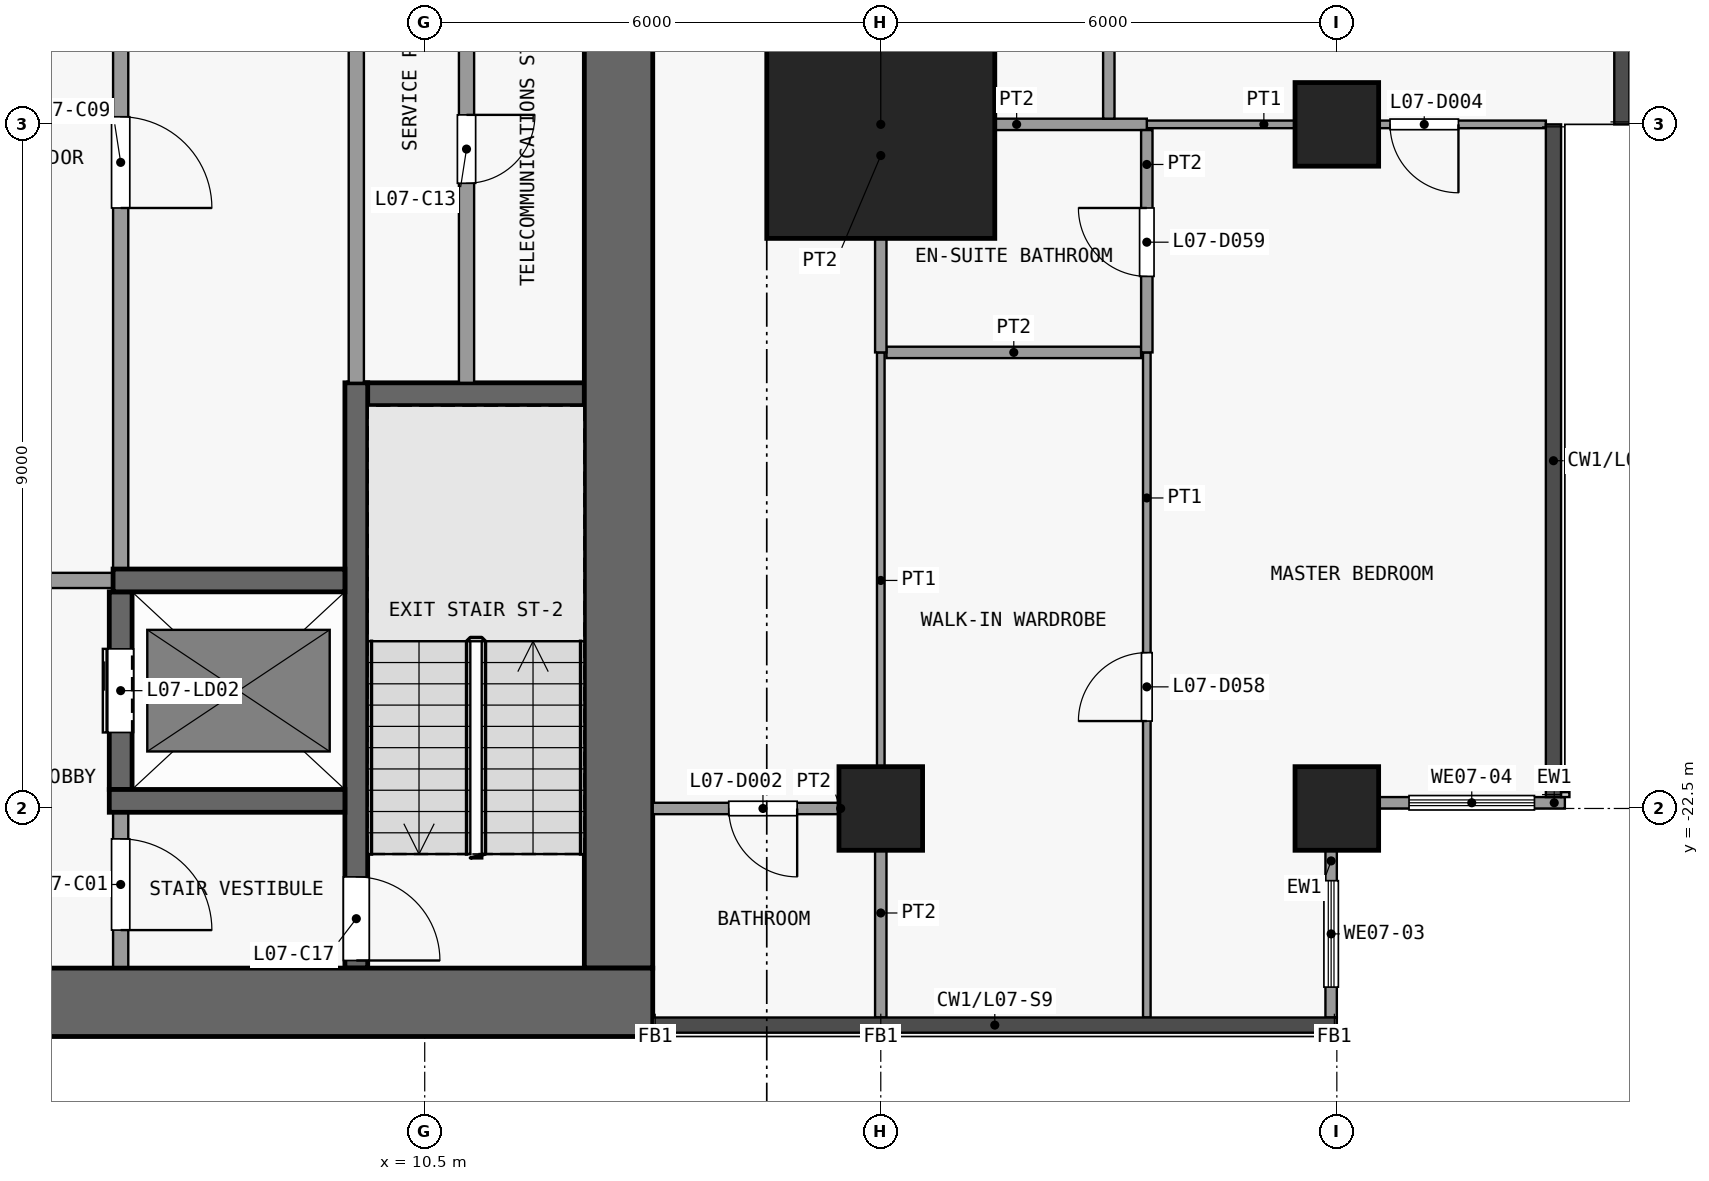
"""IFC4 building model, lengths in metres.
Left out: names, types, materials, properties, quantities, classifications, styles, units other than length and angle.
Written with IfcOpenShell. Run it as: python <this file> out.ifc"""

import sys

from ifc_helpers import new_model, si_unit, direction, frame, frame_2d, origin, origin_2d, place, context, subcontext, project, spatial, rectangle, extrude, element, fill, save


model = new_model("IFC4")
c1 = context("Model", 3, precision=1e-05, world=origin(), true_north=direction((0.0, 1.0)))
c2 = subcontext(c1, "Body", "Model", "MODEL_VIEW")
j1 = project(units=[si_unit("LENGTHUNIT", "METRE"), si_unit("PLANEANGLEUNIT", "RADIAN")], contexts=[c1])
p1 = place(None, origin())
s1 = spatial("IfcSite", under=j1, at=p1, CompositionType="ELEMENT")
p2 = place(p1, origin())
s2 = spatial("IfcBuilding", under=s1, at=p2, CompositionType="ELEMENT")
p3 = place(p2, frame((0.0, 0.0, 36.1)))
s3 = spatial("IfcBuildingStorey", under=s2, at=p3, CompositionType="ELEMENT", Elevation=36.1)
p4 = place(p3, frame((16.5, -22.5, 0.0), z_axis=(0.0, 0.0, 1.0), x_axis=(1.0, 0.0, 0.0)))
e1 = element("IfcColumn", 1, at=p4, inside=s3, PredefinedType="COLUMN", context=c2, shape_type="SweptSolid", body=[
    extrude(rectangle(XDim=1.1, YDim=1.1, at=origin_2d()), origin(), (0.0, 0.0, 1.0), 3.6),
])
p5 = place(p3, frame((16.5, -13.5, 0.0), z_axis=(0.0, 0.0, 1.0), x_axis=(1.0, 0.0, 0.0)))
e2 = element("IfcColumn", 2, at=p5, inside=s3, PredefinedType="COLUMN", context=c2, shape_type="SweptSolid", body=[
    extrude(rectangle(XDim=3.0, YDim=3.0, at=origin_2d()), origin(), (0.0, 0.0, 1.0), 3.6),
])
for number, where, z_axis, x_axis in (
    (3, (22.5, -22.5, 0.0), (0.0, 0.0, 1.0), (1.0, 0.0, 0.0)),
    (4, (22.5, -13.5, 0.0), (0.0, 0.0, 1.0), (1.0, 0.0, 0.0)),
):
    element("IfcColumn", number, at=place(p3, frame(where, z_axis=z_axis, x_axis=x_axis)), inside=s3, PredefinedType="COLUMN", context=c2, shape_type="SweptSolid", body=[
        extrude(rectangle(XDim=1.1, YDim=1.1, at=origin_2d()), origin(), (0.0, 0.0, 1.0), 3.6),
    ])
p6 = place(p3, frame((-13.5, -25.05, 0.0), z_axis=(0.0, 0.0, 1.0), x_axis=(1.0, 0.0, 0.0)))
e5 = element("IfcWall", 5, at=p6, inside=s3, PredefinedType="SHEAR", context=c2, shape_type="SweptSolid", body=[
    extrude(rectangle(XDim=27.0, YDim=0.9, at=frame_2d((13.5, 0.0))), origin(), (0.0, 0.0, 1.0), 3.3),
])
p7 = place(p3, frame((13.05, -24.6, 0.0), z_axis=(0.0, 0.0, 1.0), x_axis=(0.0, 1.0, 0.0)))
e6 = element("IfcWall", 6, at=p7, inside=s3, PredefinedType="SHEAR", context=c2, shape_type="SweptSolid", body=[
    extrude(rectangle(XDim=16.1, YDim=0.9, at=frame_2d((8.05, 0.0))), origin(), (0.0, 0.0, 1.0), 3.3),
])
p8 = place(p3, frame((6.35, -22.4, 0.0), z_axis=(0.0, 0.0, 1.0), x_axis=(1.0, 0.0, 0.0)))
e7 = element("IfcWall", 7, at=p8, inside=s3, PredefinedType="SHEAR", context=c2, shape_type="SweptSolid", body=[
    extrude(rectangle(XDim=3.1, YDim=0.3, at=frame_2d((1.55, 0.0))), origin(), (0.0, 0.0, 1.0), 3.3),
])
p9 = place(p3, frame((6.4, -19.5, 0.0), z_axis=(0.0, 0.0, 1.0), x_axis=(-1.0, 0.0, 0.0)))
e8 = element("IfcWall", 8, at=p9, inside=s3, PredefinedType="PARTITIONING", context=c2, shape_type="SweptSolid", body=[
    extrude(rectangle(XDim=3.375, YDim=0.2, at=frame_2d((1.688, 0.0))), origin(), (0.0, 0.0, 1.0), 3.3),
])
p10 = place(p9, frame((0.85, 0.0, 0.0)))
e9 = element("IfcOpeningElement", 9, at=p10, cuts=e8, PredefinedType="OPENING", context=c2, shape_type="SweptSolid", body=[
    extrude(rectangle(XDim=1.5, YDim=2.1, at=frame_2d((0.75, 1.05))), frame((0.0, 0.11, 0.0), z_axis=(0.0, -1.0, 0.0), x_axis=(1.0, 0.0, 0.0)), (0.0, 0.0, 1.0), 0.22),
])
p11 = place(p3, frame((6.4, -19.5, 0.0), z_axis=(0.0, 0.0, 1.0), x_axis=(1.0, 0.0, 0.0)))
e10 = element("IfcWall", 10, at=p11, inside=s3, PredefinedType="SHEAR", context=c2, shape_type="SweptSolid", body=[
    extrude(rectangle(XDim=3.05, YDim=0.3, at=frame_2d((1.525, 0.0))), origin(), (0.0, 0.0, 1.0), 3.3),
])
p12 = place(p3, frame((9.5, -17.05, 0.0), z_axis=(0.0, 0.0, 1.0), x_axis=(1.0, 0.0, 0.0)))
e11 = element("IfcWall", 11, at=p12, inside=s3, PredefinedType="SHEAR", context=c2, shape_type="SweptSolid", body=[
    extrude(rectangle(XDim=3.1, YDim=0.3, at=frame_2d((1.55, 0.0))), origin(), (0.0, 0.0, 1.0), 3.3),
])
p13 = place(p3, frame((6.5, -22.55, 0.0), z_axis=(0.0, 0.0, 1.0), x_axis=(0.0, -1.0, 0.0)))
e12 = element("IfcWall", 12, at=p13, inside=s3, PredefinedType="PARTITIONING", context=c2, shape_type="SweptSolid", body=[
    extrude(rectangle(XDim=2.05, YDim=0.2, at=frame_2d((1.025, 0.0))), origin(), (0.0, 0.0, 1.0), 3.3),
])
p14 = place(p13, frame((0.35, 0.0, 0.0)))
e13 = element("IfcOpeningElement", 13, at=p14, cuts=e12, PredefinedType="OPENING", context=c2, shape_type="SweptSolid", body=[
    extrude(rectangle(XDim=1.2, YDim=2.1, at=frame_2d((0.6, 1.05))), frame((0.0, 0.11, 0.0), z_axis=(0.0, -1.0, 0.0), x_axis=(1.0, 0.0, 0.0)), (0.0, 0.0, 1.0), 0.22),
])
p15 = place(p3, frame((6.5, -22.25, 0.0), z_axis=(0.0, 0.0, 1.0), x_axis=(0.0, 1.0, 0.0)))
e14 = element("IfcWall", 14, at=p15, inside=s3, PredefinedType="SHEAR", context=c2, shape_type="SweptSolid", body=[
    extrude(rectangle(XDim=2.6, YDim=0.3, at=frame_2d((1.3, 0.0))), origin(), (0.0, 0.0, 1.0), 3.3),
])
p16 = place(p15, frame((0.75, 0.0, 0.0)))
e15 = element("IfcOpeningElement", 15, at=p16, cuts=e14, PredefinedType="OPENING", context=c2, shape_type="SweptSolid", body=[
    extrude(rectangle(XDim=1.1, YDim=2.1, at=frame_2d((0.55, 1.05))), frame((0.0, 0.16, 0.0), z_axis=(0.0, -1.0, 0.0), x_axis=(1.0, 0.0, 0.0)), (0.0, 0.0, 1.0), 0.32),
])
p17 = place(p3, frame((6.5, -8.5, 0.0), z_axis=(0.0, 0.0, 1.0), x_axis=(0.0, -1.0, 0.0)))
e16 = element("IfcWall", 16, at=p17, inside=s3, PredefinedType="PARTITIONING", context=c2, shape_type="SweptSolid", body=[
    extrude(rectangle(XDim=10.85, YDim=0.2, at=frame_2d((5.425, 0.0))), origin(), (0.0, 0.0, 1.0), 3.3),
])
p18 = place(p17, frame((4.9, 0.0, 0.0)))
e17 = element("IfcOpeningElement", 17, at=p18, cuts=e16, PredefinedType="OPENING", context=c2, shape_type="SweptSolid", body=[
    extrude(rectangle(XDim=1.2, YDim=2.1, at=frame_2d((0.6, 1.05))), frame((0.0, 0.11, 0.0), z_axis=(0.0, -1.0, 0.0), x_axis=(1.0, 0.0, 0.0)), (0.0, 0.0, 1.0), 0.22),
])
p19 = place(p3, frame((9.6, -16.9, 0.0), z_axis=(0.0, 0.0, 1.0), x_axis=(0.0, -1.0, 0.0)))
e18 = element("IfcWall", 18, at=p19, inside=s3, PredefinedType="SHEAR", context=c2, shape_type="SweptSolid", body=[
    extrude(rectangle(XDim=7.7, YDim=0.3, at=frame_2d((3.85, 0.0))), origin(), (0.0, 0.0, 1.0), 3.3),
])
p20 = place(p19, frame((6.5, 0.0, 0.0)))
e19 = element("IfcOpeningElement", 19, at=p20, cuts=e18, PredefinedType="OPENING", context=c2, shape_type="SweptSolid", body=[
    extrude(rectangle(XDim=1.1, YDim=2.1, at=frame_2d((0.55, 1.05))), frame((0.0, 0.16, 0.0), z_axis=(0.0, -1.0, 0.0), x_axis=(1.0, 0.0, 0.0)), (0.0, 0.0, 1.0), 0.32),
])
p21 = place(p3, frame((9.6, -16.9, 0.0), z_axis=(0.0, 0.0, 1.0), x_axis=(0.0, 1.0, 0.0)))
e20 = element("IfcWall", 20, at=p21, inside=s3, PredefinedType="PARTITIONING", context=c2, shape_type="SweptSolid", body=[
    extrude(rectangle(XDim=8.4, YDim=0.2, at=frame_2d((4.2, 0.0))), origin(), (0.0, 0.0, 1.0), 3.3),
])
p22 = place(p3, frame((11.05, -10.5, 0.0), z_axis=(0.0, 0.0, 1.0), x_axis=(0.0, -1.0, 0.0)))
e21 = element("IfcWall", 21, at=p22, inside=s3, PredefinedType="PARTITIONING", context=c2, shape_type="SweptSolid", body=[
    extrude(rectangle(XDim=6.4, YDim=0.2, at=frame_2d((3.2, 0.0))), origin(), (0.0, 0.0, 1.0), 3.3),
])
p23 = place(p22, frame((2.875, 0.0, 0.0)))
e22 = element("IfcOpeningElement", 22, at=p23, cuts=e21, PredefinedType="OPENING", context=c2, shape_type="SweptSolid", body=[
    extrude(rectangle(XDim=0.9, YDim=2.1, at=frame_2d((0.45, 1.05))), frame((0.0, 0.11, 0.0), z_axis=(0.0, -1.0, 0.0), x_axis=(1.0, 0.0, 0.0)), (0.0, 0.0, 1.0), 0.22),
])
p24 = place(p3, frame((22.425, -23.05, 0.0), z_axis=(0.0, 0.0, 1.0), x_axis=(0.0, -1.0, 0.0)))
e23 = element("IfcWall", 23, at=p24, inside=s3, PredefinedType="SOLIDWALL", context=c2, shape_type="SweptSolid", body=[
    extrude(rectangle(XDim=2.2, YDim=0.15, at=frame_2d((1.1, 0.0))), origin(), (0.0, 0.0, 1.0), 3.3),
])
p25 = place(p24, frame((0.4, 0.0, 0.9)))
e24 = element("IfcOpeningElement", 24, at=p25, cuts=e23, PredefinedType="OPENING", context=c2, shape_type="SweptSolid", body=[
    extrude(rectangle(XDim=1.4, YDim=2.4, at=frame_2d((0.7, 1.2))), frame((0.0, 0.085, 0.0), z_axis=(0.0, -1.0, 0.0), x_axis=(1.0, 0.0, 0.0)), (0.0, 0.0, 1.0), 0.17),
])
p26 = place(p3, frame((25.5, -22.425, 0.0), z_axis=(0.0, 0.0, 1.0), x_axis=(-1.0, 0.0, 0.0)))
e25 = element("IfcWall", 25, at=p26, inside=s3, PredefinedType="SOLIDWALL", context=c2, shape_type="SweptSolid", body=[
    extrude(rectangle(XDim=2.45, YDim=0.15, at=frame_2d((1.225, 0.0))), origin(), (0.0, 0.0, 1.0), 3.3),
])
p27 = place(p26, frame((0.4, 0.0, 0.9)))
e26 = element("IfcOpeningElement", 26, at=p27, cuts=e25, PredefinedType="OPENING", context=c2, shape_type="SweptSolid", body=[
    extrude(rectangle(XDim=1.65, YDim=2.4, at=frame_2d((0.825, 1.2))), frame((0.0, 0.085, 0.0), z_axis=(0.0, -1.0, 0.0), x_axis=(1.0, 0.0, 0.0)), (0.0, 0.0, 1.0), 0.17),
])
p28 = place(p3, frame((13.5, -22.5, 0.0), z_axis=(0.0, 0.0, 1.0), x_axis=(1.0, 0.0, 0.0)))
e27 = element("IfcWall", 27, at=p28, inside=s3, PredefinedType="PARTITIONING", context=c2, shape_type="SweptSolid", body=[
    extrude(rectangle(XDim=2.925, YDim=0.15, at=frame_2d((1.462, 0.0))), origin(), (0.0, 0.0, 1.0), 3.3),
])
p29 = place(p28, frame((1.0, 0.0, 0.0)))
e28 = element("IfcOpeningElement", 28, at=p29, cuts=e27, PredefinedType="OPENING", context=c2, shape_type="SweptSolid", body=[
    extrude(rectangle(XDim=0.9, YDim=2.1, at=frame_2d((0.45, 1.05))), frame((0.0, 0.085, 0.0), z_axis=(0.0, -1.0, 0.0), x_axis=(1.0, 0.0, 0.0)), (0.0, 0.0, 1.0), 0.17),
])
p30 = place(p3, frame((16.575, -16.5, 0.0), z_axis=(0.0, 0.0, 1.0), x_axis=(1.0, 0.0, 0.0)))
e29 = element("IfcWall", 29, at=p30, inside=s3, PredefinedType="PARTITIONING", context=c2, shape_type="SweptSolid", body=[
    extrude(rectangle(XDim=3.35, YDim=0.15, at=frame_2d((1.675, 0.0))), origin(), (0.0, 0.0, 1.0), 3.3),
])
p31 = place(p3, frame((20.0, -13.5, 0.0), z_axis=(0.0, 0.0, 1.0), x_axis=(1.0, 0.0, 0.0)))
e30 = element("IfcWall", 30, at=p31, inside=s3, PredefinedType="PARTITIONING", context=c2, shape_type="SweptSolid", body=[
    extrude(rectangle(XDim=5.25, YDim=0.1, at=frame_2d((2.625, 0.0))), origin(), (0.0, 0.0, 1.0), 3.3),
])
p32 = place(p31, frame((3.2, 0.0, 0.0)))
e31 = element("IfcOpeningElement", 31, at=p32, cuts=e30, PredefinedType="OPENING", context=c2, shape_type="SweptSolid", body=[
    extrude(rectangle(XDim=0.9, YDim=2.1, at=frame_2d((0.45, 1.05))), frame((0.0, 0.06, 0.0), z_axis=(0.0, -1.0, 0.0), x_axis=(1.0, 0.0, 0.0)), (0.0, 0.0, 1.0), 0.12),
])
p33 = place(p3, frame((16.575, -13.5, 0.0), z_axis=(0.0, 0.0, 1.0), x_axis=(1.0, 0.0, 0.0)))
e32 = element("IfcWall", 32, at=p33, inside=s3, PredefinedType="PARTITIONING", context=c2, shape_type="SweptSolid", body=[
    extrude(rectangle(XDim=3.425, YDim=0.15, at=frame_2d((1.712, 0.0))), origin(), (0.0, 0.0, 1.0), 3.3),
])
p34 = place(p3, frame((16.5, -22.5, 0.0), z_axis=(0.0, 0.0, 1.0), x_axis=(0.0, 1.0, 0.0)))
e33 = element("IfcWall", 33, at=p34, inside=s3, PredefinedType="PARTITIONING", context=c2, shape_type="SweptSolid", body=[
    extrude(rectangle(XDim=6.0, YDim=0.1, at=frame_2d((3.0, 0.0))), origin(), (0.0, 0.0, 1.0), 3.3),
])
p35 = place(p3, frame((16.5, -25.25, 0.0), z_axis=(0.0, 0.0, 1.0), x_axis=(0.0, 1.0, 0.0)))
e34 = element("IfcWall", 34, at=p35, inside=s3, PredefinedType="PARTITIONING", context=c2, shape_type="SweptSolid", body=[
    extrude(rectangle(XDim=2.75, YDim=0.15, at=frame_2d((1.375, 0.0))), origin(), (0.0, 0.0, 1.0), 3.3),
])
p36 = place(p3, frame((16.5, -16.5, 0.0), z_axis=(0.0, 0.0, 1.0), x_axis=(0.0, 1.0, 0.0)))
e35 = element("IfcWall", 35, at=p36, inside=s3, PredefinedType="PARTITIONING", context=c2, shape_type="SweptSolid", body=[
    extrude(rectangle(XDim=8.5, YDim=0.15, at=frame_2d((4.25, 0.0))), origin(), (0.0, 0.0, 1.0), 3.3),
])
p37 = place(p36, frame((5.3, 0.0, 0.0)))
e36 = element("IfcOpeningElement", 36, at=p37, cuts=e35, PredefinedType="OPENING", context=c2, shape_type="SweptSolid", body=[
    extrude(rectangle(XDim=0.9, YDim=2.1, at=frame_2d((0.45, 1.05))), frame((0.0, 0.085, 0.0), z_axis=(0.0, -1.0, 0.0), x_axis=(1.0, 0.0, 0.0)), (0.0, 0.0, 1.0), 0.17),
])
p38 = place(p3, frame((19.5, -13.425, 0.0), z_axis=(0.0, 0.0, 1.0), x_axis=(0.0, 1.0, 0.0)))
e37 = element("IfcWall", 37, at=p38, inside=s3, PredefinedType="PARTITIONING", context=c2, shape_type="SweptSolid", body=[
    extrude(rectangle(XDim=5.425, YDim=0.15, at=frame_2d((2.712, 0.0))), origin(), (0.0, 0.0, 1.0), 3.3),
])
p39 = place(p38, frame((2.3, 0.0, 0.0)))
e38 = element("IfcOpeningElement", 38, at=p39, cuts=e37, PredefinedType="OPENING", context=c2, shape_type="SweptSolid", body=[
    extrude(rectangle(XDim=0.9, YDim=2.1, at=frame_2d((0.45, 1.05))), frame((0.0, 0.085, 0.0), z_axis=(0.0, -1.0, 0.0), x_axis=(1.0, 0.0, 0.0)), (0.0, 0.0, 1.0), 0.17),
])
p40 = place(p3, frame((20.0, -25.25, 0.0), z_axis=(0.0, 0.0, 1.0), x_axis=(0.0, 1.0, 0.0)))
e39 = element("IfcWall", 39, at=p40, inside=s3, PredefinedType="PARTITIONING", context=c2, shape_type="SweptSolid", body=[
    extrude(rectangle(XDim=8.75, YDim=0.1, at=frame_2d((4.375, 0.0))), origin(), (0.0, 0.0, 1.0), 3.3),
])
p41 = place(p40, frame((3.9, 0.0, 0.0)))
e40 = element("IfcOpeningElement", 40, at=p41, cuts=e39, PredefinedType="OPENING", context=c2, shape_type="SweptSolid", body=[
    extrude(rectangle(XDim=0.9, YDim=2.1, at=frame_2d((0.45, 1.05))), frame((0.0, 0.06, 0.0), z_axis=(0.0, -1.0, 0.0), x_axis=(1.0, 0.0, 0.0)), (0.0, 0.0, 1.0), 0.12),
])
p42 = place(p3, frame((20.0, -16.5, 0.0), z_axis=(0.0, 0.0, 1.0), x_axis=(0.0, 1.0, 0.0)))
e41 = element("IfcWall", 41, at=p42, inside=s3, PredefinedType="PARTITIONING", context=c2, shape_type="SweptSolid", body=[
    extrude(rectangle(XDim=2.925, YDim=0.15, at=frame_2d((1.462, 0.0))), origin(), (0.0, 0.0, 1.0), 3.3),
])
p43 = place(p42, frame((1.0, 0.0, 0.0)))
e42 = element("IfcOpeningElement", 42, at=p43, cuts=e41, PredefinedType="OPENING", context=c2, shape_type="SweptSolid", body=[
    extrude(rectangle(XDim=0.9, YDim=2.1, at=frame_2d((0.45, 1.05))), frame((0.0, 0.085, 0.0), z_axis=(0.0, -1.0, 0.0), x_axis=(1.0, 0.0, 0.0)), (0.0, 0.0, 1.0), 0.17),
])
p44 = place(p16, origin())
e43 = element("IfcDoor", 43, at=p44, inside=s3, OperationType="DOUBLE_DOOR_SLIDING", PredefinedType="DOOR", context=c2, shape_type="SweptSolid", body=[
    extrude(rectangle(XDim=1.1, YDim=2.1, at=frame_2d((0.55, 1.05))), frame((0.0, 0.025, 0.0), z_axis=(0.0, -1.0, 0.0), x_axis=(1.0, 0.0, 0.0)), (0.0, 0.0, 1.0), 0.05),
])
fill(e15, e43)
p45 = place(p14, origin())
e44 = element("IfcDoor", 44, at=p45, inside=s3, OperationType="SINGLE_SWING_RIGHT", PredefinedType="DOOR", context=c2, shape_type="SweptSolid", body=[
    extrude(rectangle(XDim=1.2, YDim=2.1, at=frame_2d((0.6, 1.05))), frame((0.0, 0.025, 0.0), z_axis=(0.0, -1.0, 0.0), x_axis=(1.0, 0.0, 0.0)), (0.0, 0.0, 1.0), 0.05),
])
fill(e13, e44)
p46 = place(p18, origin())
e45 = element("IfcDoor", 45, at=p46, inside=s3, OperationType="SINGLE_SWING_RIGHT", PredefinedType="DOOR", context=c2, shape_type="SweptSolid", body=[
    extrude(rectangle(XDim=1.2, YDim=2.1, at=frame_2d((0.6, 1.05))), frame((0.0, 0.025, 0.0), z_axis=(0.0, -1.0, 0.0), x_axis=(1.0, 0.0, 0.0)), (0.0, 0.0, 1.0), 0.05),
])
fill(e17, e45)
p47 = place(p23, origin())
e46 = element("IfcDoor", 46, at=p47, inside=s3, OperationType="SINGLE_SWING_LEFT", PredefinedType="DOOR", context=c2, shape_type="SweptSolid", body=[
    extrude(rectangle(XDim=0.9, YDim=2.1, at=frame_2d((0.45, 1.05))), frame((0.0, 0.025, 0.0), z_axis=(0.0, -1.0, 0.0), x_axis=(1.0, 0.0, 0.0)), (0.0, 0.0, 1.0), 0.05),
])
fill(e22, e46)
p48 = place(p20, origin())
e47 = element("IfcDoor", 47, at=p48, inside=s3, OperationType="SINGLE_SWING_RIGHT", PredefinedType="DOOR", context=c2, shape_type="SweptSolid", body=[
    extrude(rectangle(XDim=1.1, YDim=2.1, at=frame_2d((0.55, 1.05))), frame((0.0, 0.025, 0.0), z_axis=(0.0, -1.0, 0.0), x_axis=(1.0, 0.0, 0.0)), (0.0, 0.0, 1.0), 0.05),
])
fill(e19, e47)
p49 = place(p25, origin())
e48 = element("IfcWindow", 48, at=p49, inside=s3, PartitioningType="SINGLE_PANEL", PredefinedType="WINDOW", context=c2, shape_type="SweptSolid", body=[
    extrude(rectangle(XDim=1.4, YDim=2.4, at=frame_2d((0.7, 1.2))), frame((0.0, 0.03, 0.0), z_axis=(0.0, -1.0, 0.0), x_axis=(1.0, 0.0, 0.0)), (0.0, 0.0, 1.0), 0.06),
])
fill(e24, e48)
p50 = place(p27, origin())
e49 = element("IfcWindow", 49, at=p50, inside=s3, PartitioningType="SINGLE_PANEL", PredefinedType="WINDOW", context=c2, shape_type="SweptSolid", body=[
    extrude(rectangle(XDim=1.65, YDim=2.4, at=frame_2d((0.825, 1.2))), frame((0.0, 0.03, 0.0), z_axis=(0.0, -1.0, 0.0), x_axis=(1.0, 0.0, 0.0)), (0.0, 0.0, 1.0), 0.06),
])
fill(e26, e49)
p51 = place(p29, origin())
e50 = element("IfcDoor", 50, at=p51, inside=s3, OperationType="SINGLE_SWING_RIGHT", PredefinedType="DOOR", context=c2, shape_type="SweptSolid", body=[
    extrude(rectangle(XDim=0.9, YDim=2.1, at=frame_2d((0.45, 1.05))), frame((0.0, 0.025, 0.0), z_axis=(0.0, -1.0, 0.0), x_axis=(1.0, 0.0, 0.0)), (0.0, 0.0, 1.0), 0.05),
])
fill(e28, e50)
p52 = place(p32, origin())
e51 = element("IfcDoor", 51, at=p52, inside=s3, OperationType="SINGLE_SWING_RIGHT", PredefinedType="DOOR", context=c2, shape_type="SweptSolid", body=[
    extrude(rectangle(XDim=0.9, YDim=2.1, at=frame_2d((0.45, 1.05))), frame((0.0, 0.025, 0.0), z_axis=(0.0, -1.0, 0.0), x_axis=(1.0, 0.0, 0.0)), (0.0, 0.0, 1.0), 0.05),
])
fill(e31, e51)
p53 = place(p41, origin())
e52 = element("IfcDoor", 52, at=p53, inside=s3, OperationType="SINGLE_SWING_RIGHT", PredefinedType="DOOR", context=c2, shape_type="SweptSolid", body=[
    extrude(rectangle(XDim=0.9, YDim=2.1, at=frame_2d((0.45, 1.05))), frame((0.0, 0.025, 0.0), z_axis=(0.0, -1.0, 0.0), x_axis=(1.0, 0.0, 0.0)), (0.0, 0.0, 1.0), 0.05),
])
fill(e40, e52)
p54 = place(p43, origin())
e53 = element("IfcDoor", 53, at=p54, inside=s3, OperationType="SINGLE_SWING_LEFT", PredefinedType="DOOR", context=c2, shape_type="SweptSolid", body=[
    extrude(rectangle(XDim=0.9, YDim=2.1, at=frame_2d((0.45, 1.05))), frame((0.0, 0.025, 0.0), z_axis=(0.0, -1.0, 0.0), x_axis=(1.0, 0.0, 0.0)), (0.0, 0.0, 1.0), 0.05),
])
fill(e42, e53)
save(model, sys.argv[1])
